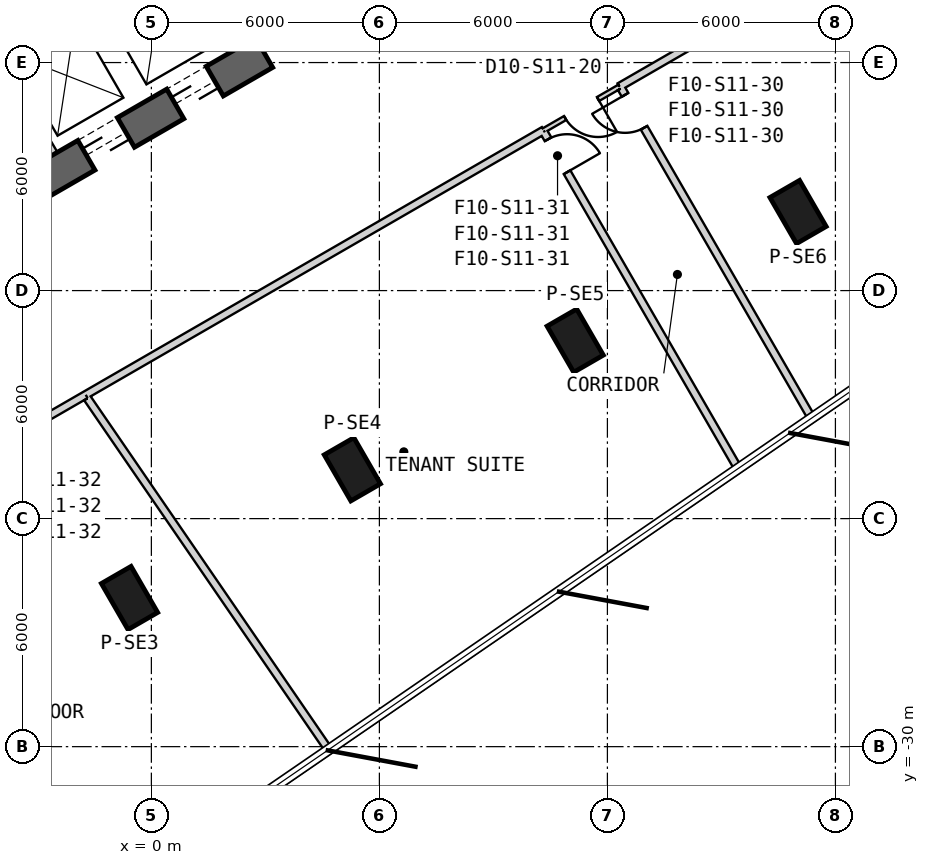
"""IFC4 building model, lengths in metres.
Left out: names, types, materials, properties, quantities, classifications, styles, units other than length and angle.
Written with IfcOpenShell. Run it as: python <this file> out.ifc"""

import sys

from ifc_helpers import new_model, si_unit, direction, frame, frame_2d, origin, origin_2d, place, context, subcontext, project, spatial, rectangle, extrude, element, fill, save


model = new_model("IFC4")
c1 = context("Model", 3, precision=1e-05, world=origin(), true_north=direction((0.0, 1.0)))
c2 = subcontext(c1, "Body", "Model", "MODEL_VIEW")
j1 = project(units=[si_unit("LENGTHUNIT", "METRE"), si_unit("PLANEANGLEUNIT", "RADIAN")], contexts=[c1])
p1 = place(None, origin())
s1 = spatial("IfcSite", under=j1, at=p1, CompositionType="ELEMENT")
p2 = place(p1, origin())
s2 = spatial("IfcBuilding", under=s1, at=p2, CompositionType="ELEMENT")
p3 = place(p2, frame((0.0, 0.0, 193.2)))
s3 = spatial("IfcBuildingStorey", under=s2, at=p3, CompositionType="ELEMENT", Elevation=193.2)
for number, where, z_axis, x_axis in (
    (1, (-0.575, -26.088, 0.0), (0.0, 0.0, 1.0), (0.5, -0.866, 0.0)),
    (2, (5.289, -22.703, 0.0), (0.0, 0.0, 1.0), (0.5, -0.866, 0.0)),
    (3, (11.153, -19.317, 0.0), (0.0, 0.0, 1.0), (0.5, -0.866, 0.0)),
    (4, (17.017, -15.932, 0.0), (0.0, 0.0, 1.0), (0.5, -0.866, 0.0)),
):
    element("IfcColumn", number, at=place(p3, frame(where, z_axis=z_axis, x_axis=x_axis)), inside=s3, PredefinedType="COLUMN", context=c2, shape_type="SweptSolid", body=[
        extrude(rectangle(XDim=1.4, YDim=0.9, at=origin_2d()), origin(), (0.0, 0.0, 1.0), 4.0),
    ])
p4 = place(p3, frame((-7.825, -17.97, 0.0), z_axis=(0.0, 0.0, 1.0), x_axis=(0.866028369851, 0.499994862586, 0.0)))
e5 = element("IfcWall", 5, at=p4, inside=s3, PredefinedType="SHEAR", context=c2, shape_type="SweptSolid", body=[
    extrude(rectangle(XDim=31.523, YDim=0.9, at=frame_2d((15.762, 0.0))), origin(), (0.0, 0.0, 1.0), 4.0),
])
p5 = place(p4, frame((7.062, 0.0, 0.0)))
e6 = element("IfcOpeningElement", 6, at=p5, cuts=e5, PredefinedType="OPENING", context=c2, shape_type="SweptSolid", body=[
    extrude(rectangle(XDim=1.2, YDim=2.4, at=frame_2d((0.6, 1.2))), frame((0.0, 0.46, 0.0), z_axis=(0.0, -1.0, 0.0), x_axis=(1.0, 0.0, 0.0)), (0.0, 0.0, 1.0), 0.92),
])
p6 = place(p4, frame((9.762, 0.0, 0.0)))
e7 = element("IfcOpeningElement", 7, at=p6, cuts=e5, PredefinedType="OPENING", context=c2, shape_type="SweptSolid", body=[
    extrude(rectangle(XDim=1.2, YDim=2.4, at=frame_2d((0.6, 1.2))), frame((0.0, 0.46, 0.0), z_axis=(0.0, -1.0, 0.0), x_axis=(1.0, 0.0, 0.0)), (0.0, 0.0, 1.0), 0.92),
])
p7 = place(p4, frame((12.462, 0.0, 0.0)))
e8 = element("IfcOpeningElement", 8, at=p7, cuts=e5, PredefinedType="OPENING", context=c2, shape_type="SweptSolid", body=[
    extrude(rectangle(XDim=1.2, YDim=2.4, at=frame_2d((0.6, 1.2))), frame((0.0, 0.46, 0.0), z_axis=(0.0, -1.0, 0.0), x_axis=(1.0, 0.0, 0.0)), (0.0, 0.0, 1.0), 0.92),
])
p8 = place(p4, frame((15.162, 0.0, 0.0)))
e9 = element("IfcOpeningElement", 9, at=p8, cuts=e5, PredefinedType="OPENING", context=c2, shape_type="SweptSolid", body=[
    extrude(rectangle(XDim=1.2, YDim=2.4, at=frame_2d((0.6, 1.2))), frame((0.0, 0.46, 0.0), z_axis=(0.0, -1.0, 0.0), x_axis=(1.0, 0.0, 0.0)), (0.0, 0.0, 1.0), 0.92),
])
p9 = place(p4, frame((17.862, 0.0, 0.0)))
e10 = element("IfcOpeningElement", 10, at=p9, cuts=e5, PredefinedType="OPENING", context=c2, shape_type="SweptSolid", body=[
    extrude(rectangle(XDim=1.2, YDim=2.4, at=frame_2d((0.6, 1.2))), frame((0.0, 0.46, 0.0), z_axis=(0.0, -1.0, 0.0), x_axis=(1.0, 0.0, 0.0)), (0.0, 0.0, 1.0), 0.92),
])
p10 = place(p4, frame((20.562, 0.0, 0.0)))
e11 = element("IfcOpeningElement", 11, at=p10, cuts=e5, PredefinedType="OPENING", context=c2, shape_type="SweptSolid", body=[
    extrude(rectangle(XDim=1.2, YDim=2.4, at=frame_2d((0.6, 1.2))), frame((0.0, 0.46, 0.0), z_axis=(0.0, -1.0, 0.0), x_axis=(1.0, 0.0, 0.0)), (0.0, 0.0, 1.0), 0.92),
])
p11 = place(p4, frame((26.712, 0.0, 0.0)))
e12 = element("IfcOpeningElement", 12, at=p11, cuts=e5, PredefinedType="OPENING", context=c2, shape_type="SweptSolid", body=[
    extrude(rectangle(XDim=1.2, YDim=2.4, at=frame_2d((0.6, 1.2))), frame((0.0, 0.46, 0.0), z_axis=(0.0, -1.0, 0.0), x_axis=(1.0, 0.0, 0.0)), (0.0, 0.0, 1.0), 0.92),
])
p12 = place(p4, frame((3.612, 0.0, 0.0)))
e13 = element("IfcOpeningElement", 13, at=p12, cuts=e5, PredefinedType="OPENING", context=c2, shape_type="SweptSolid", body=[
    extrude(rectangle(XDim=1.2, YDim=2.4, at=frame_2d((0.6, 1.2))), frame((0.0, 0.46, 0.0), z_axis=(0.0, -1.0, 0.0), x_axis=(1.0, 0.0, 0.0)), (0.0, 0.0, 1.0), 0.92),
])
p13 = place(p3, frame((-2.558, -14.409, 0.0), z_axis=(0.0, 0.0, 1.0), x_axis=(-0.507997497166, 0.861358544901, 0.0)))
e14 = element("IfcWall", 14, at=p13, inside=s3, PredefinedType="PLUMBINGWALL", context=c2, shape_type="SweptSolid", body=[
    extrude(rectangle(XDim=3.35, YDim=0.2, at=frame_2d((1.675, 0.0))), origin(), (0.0, 0.0, 1.0), 3.7),
])
p14 = place(p3, frame((12.317, -12.634, 0.0), z_axis=(0.0, 0.0, 1.0), x_axis=(-0.86602648383, -0.499998129301, 0.0)))
e15 = element("IfcWall", 15, at=p14, inside=s3, PredefinedType="PARTITIONING", context=c2, shape_type="SweptSolid", body=[
    extrude(rectangle(XDim=2.3, YDim=0.12, at=frame_2d((1.15, 0.0))), origin(), (0.0, 0.0, 1.0), 3.7),
])
p15 = place(p14, frame((0.65, 0.0, 0.0)))
e16 = element("IfcOpeningElement", 16, at=p15, cuts=e15, PredefinedType="OPENING", context=c2, shape_type="SweptSolid", body=[
    extrude(rectangle(XDim=1.0, YDim=2.1, at=frame_2d((0.5, 1.05))), frame((0.0, 0.07, 0.0), z_axis=(0.0, -1.0, 0.0), x_axis=(1.0, 0.0, 0.0)), (0.0, 0.0, 1.0), 0.14),
])
p16 = place(p3, frame((-6.019, -23.22, 0.0), z_axis=(0.0, 0.0, 1.0), x_axis=(0.866018215049, 0.500012451049, 0.0)))
e17 = element("IfcWall", 17, at=p16, inside=s3, PredefinedType="PARTITIONING", context=c2, shape_type="SweptSolid", body=[
    extrude(rectangle(XDim=4.955, YDim=0.2, at=frame_2d((2.478, 0.0))), origin(), (0.0, 0.0, 1.0), 2.88),
])
p17 = place(p16, frame((2.02, 0.0, 0.0)))
e18 = element("IfcOpeningElement", 18, at=p17, cuts=e17, PredefinedType="OPENING", context=c2, shape_type="SweptSolid", body=[
    extrude(rectangle(XDim=1.0, YDim=2.1, at=frame_2d((0.5, 1.05))), frame((0.0, 0.11, 0.0), z_axis=(0.0, -1.0, 0.0), x_axis=(1.0, 0.0, 0.0)), (0.0, 0.0, 1.0), 0.22),
])
p18 = place(p3, frame((-1.727, -20.743, 0.0), z_axis=(0.0, 0.0, 1.0), x_axis=(0.866022578741, 0.500004893086, 0.0)))
e19 = element("IfcWall", 19, at=p18, inside=s3, PredefinedType="PARTITIONING", context=c2, shape_type="SweptSolid", body=[
    extrude(rectangle(XDim=13.917, YDim=0.2, at=frame_2d((6.958, 0.0))), origin(), (0.0, 0.0, 1.0), 2.98),
])
p19 = place(p3, frame((12.317, -12.634, 0.0), z_axis=(0.0, 0.0, 1.0), x_axis=(0.866028561818, 0.499994530085, 0.0)))
e20 = element("IfcWall", 20, at=p19, inside=s3, PredefinedType="PARTITIONING", context=c2, shape_type="SweptSolid", body=[
    extrude(rectangle(XDim=12.273, YDim=0.2, at=frame_2d((6.136, 0.0))), origin(), (0.0, 0.0, 1.0), 2.88),
])
p20 = place(p3, frame((17.375, -21.355, 0.0), z_axis=(0.0, 0.0, 1.0), x_axis=(-0.500014165022, 0.866017225451, 0.0)))
e21 = element("IfcWall", 21, at=p20, inside=s3, PredefinedType="PARTITIONING", context=c2, shape_type="SweptSolid", body=[
    extrude(rectangle(XDim=10.022, YDim=0.2, at=frame_2d((5.011, 0.0))), origin(), (0.0, 0.0, 1.0), 3.7),
])
p21 = place(p20, frame((8.822, 0.0, 0.0)))
e22 = element("IfcOpeningElement", 22, at=p21, cuts=e21, PredefinedType="OPENING", context=c2, shape_type="SweptSolid", body=[
    extrude(rectangle(XDim=1.0, YDim=2.1, at=frame_2d((0.5, 1.05))), frame((0.0, 0.11, 0.0), z_axis=(0.0, -1.0, 0.0), x_axis=(1.0, 0.0, 0.0)), (0.0, 0.0, 1.0), 0.22),
])
p22 = place(p3, frame((10.338, -13.846, 0.0), z_axis=(0.0, 0.0, 1.0), x_axis=(0.499983401189, -0.8660349869, 0.0)))
e23 = element("IfcWall", 23, at=p22, inside=s3, PredefinedType="PARTITIONING", context=c2, shape_type="SweptSolid", body=[
    extrude(rectangle(XDim=10.204, YDim=0.2, at=frame_2d((5.102, 0.0))), origin(), (0.0, 0.0, 1.0), 3.7),
])
p23 = place(p22, frame((0.2, 0.0, 0.0)))
e24 = element("IfcOpeningElement", 24, at=p23, cuts=e23, PredefinedType="OPENING", context=c2, shape_type="SweptSolid", body=[
    extrude(rectangle(XDim=1.0, YDim=2.1, at=frame_2d((0.5, 1.05))), frame((0.0, 0.11, 0.0), z_axis=(0.0, -1.0, 0.0), x_axis=(1.0, 0.0, 0.0)), (0.0, 0.0, 1.0), 0.22),
])
p24 = place(p3, frame((4.662, -30.081, 0.0), z_axis=(0.0, 0.0, 1.0), x_axis=(-0.565886599798, 0.824483084223, 0.0)))
e25 = element("IfcWall", 25, at=p24, inside=s3, PredefinedType="PARTITIONING", context=c2, shape_type="SweptSolid", body=[
    extrude(rectangle(XDim=11.216, YDim=0.2, at=frame_2d((5.608, 0.0))), origin(), (0.0, 0.0, 1.0), 2.98),
])
p25 = place(p15, origin())
e26 = element("IfcDoor", 26, at=p25, inside=s3, OperationType="SINGLE_SWING_RIGHT", PredefinedType="NOTDEFINED", context=c2, shape_type="SweptSolid", body=[
    extrude(rectangle(XDim=1.0, YDim=2.1, at=frame_2d((0.5, 1.05))), frame((0.0, 0.025, 0.0), z_axis=(0.0, -1.0, 0.0), x_axis=(1.0, 0.0, 0.0)), (0.0, 0.0, 1.0), 0.05),
])
fill(e16, e26)
p26 = place(p21, origin())
e27 = element("IfcDoor", 27, at=p26, inside=s3, OperationType="SINGLE_SWING_LEFT", PredefinedType="USERDEFINED", context=c2, shape_type="SweptSolid", body=[
    extrude(rectangle(XDim=1.0, YDim=2.1, at=frame_2d((0.5, 1.05))), frame((0.0, 0.025, 0.0), z_axis=(0.0, -1.0, 0.0), x_axis=(1.0, 0.0, 0.0)), (0.0, 0.0, 1.0), 0.05),
])
fill(e22, e27)
p27 = place(p23, origin())
e28 = element("IfcDoor", 28, at=p27, inside=s3, OperationType="SINGLE_SWING_RIGHT", PredefinedType="USERDEFINED", context=c2, shape_type="SweptSolid", body=[
    extrude(rectangle(XDim=1.0, YDim=2.1, at=frame_2d((0.5, 1.05))), frame((0.0, 0.025, 0.0), z_axis=(0.0, -1.0, 0.0), x_axis=(1.0, 0.0, 0.0)), (0.0, 0.0, 1.0), 0.05),
])
fill(e24, e28)
p28 = place(p5, origin())
e29 = element("IfcDoor", 29, at=p28, inside=s3, OperationType="SLIDING_TO_LEFT", PredefinedType="USERDEFINED", context=c2, shape_type="SweptSolid", body=[
    extrude(rectangle(XDim=1.2, YDim=2.4, at=frame_2d((0.6, 1.2))), frame((0.0, 0.025, 0.0), z_axis=(0.0, -1.0, 0.0), x_axis=(1.0, 0.0, 0.0)), (0.0, 0.0, 1.0), 0.05),
])
fill(e6, e29)
p29 = place(p6, origin())
e30 = element("IfcDoor", 30, at=p29, inside=s3, OperationType="SLIDING_TO_LEFT", PredefinedType="USERDEFINED", context=c2, shape_type="SweptSolid", body=[
    extrude(rectangle(XDim=1.2, YDim=2.4, at=frame_2d((0.6, 1.2))), frame((0.0, 0.025, 0.0), z_axis=(0.0, -1.0, 0.0), x_axis=(1.0, 0.0, 0.0)), (0.0, 0.0, 1.0), 0.05),
])
fill(e7, e30)
p30 = place(p7, origin())
e31 = element("IfcDoor", 31, at=p30, inside=s3, OperationType="SLIDING_TO_LEFT", PredefinedType="USERDEFINED", context=c2, shape_type="SweptSolid", body=[
    extrude(rectangle(XDim=1.2, YDim=2.4, at=frame_2d((0.6, 1.2))), frame((0.0, 0.025, 0.0), z_axis=(0.0, -1.0, 0.0), x_axis=(1.0, 0.0, 0.0)), (0.0, 0.0, 1.0), 0.05),
])
fill(e8, e31)
save(model, sys.argv[1])
